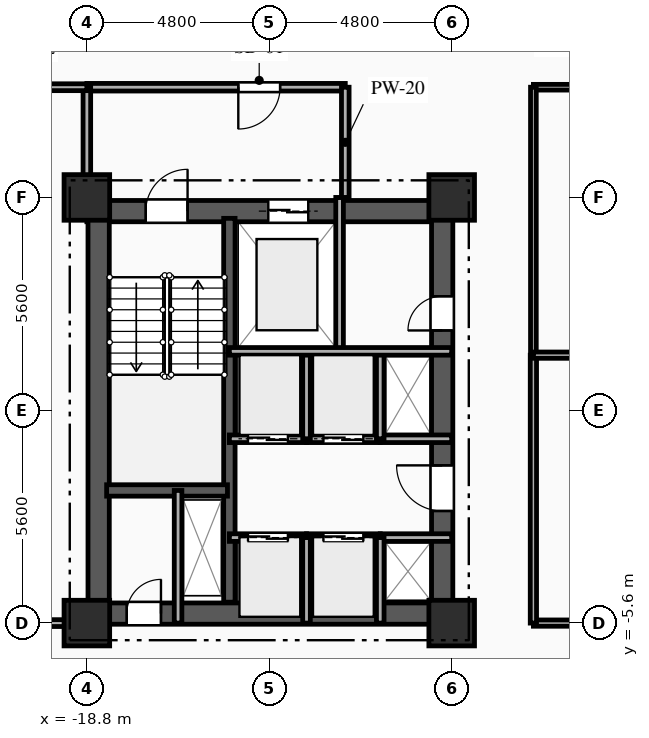
"""IFC4 building model, lengths in metres.
Left out: names, types, materials, properties, quantities, classifications, styles, units other than length and angle.
Written with IfcOpenShell. Run it as: python <this file> out.ifc"""

import sys

from ifc_helpers import new_model, si_unit, direction, frame, frame_2d, origin, origin_2d, place, context, subcontext, project, spatial, rectangle, extrude, element, fill, save


model = new_model("IFC4")
c1 = context("Model", 3, precision=1e-05, world=origin(), true_north=direction((0.0, 1.0)))
c2 = subcontext(c1, "Body", "Model", "MODEL_VIEW")
j1 = project(units=[si_unit("LENGTHUNIT", "METRE"), si_unit("PLANEANGLEUNIT", "RADIAN")], contexts=[c1])
p1 = place(None, origin())
s1 = spatial("IfcSite", under=j1, at=p1, CompositionType="ELEMENT")
p2 = place(p1, origin())
s2 = spatial("IfcBuilding", under=s1, at=p2, CompositionType="ELEMENT")
p3 = place(p2, frame((0.0, 0.0, 57.15)))
s3 = spatial("IfcBuildingStorey", under=s2, at=p3, CompositionType="ELEMENT", Elevation=57.15)
for number, where, z_axis, x_axis in (
    (1, (-18.8, -5.6, 0.0), (0.0, 0.0, 1.0), (1.0, 0.0, 0.0)),
    (2, (-18.8, 5.6, 0.0), (0.0, 0.0, 1.0), (1.0, 0.0, 0.0)),
    (3, (-9.2, -5.6, 0.0), (0.0, 0.0, 1.0), (1.0, 0.0, 0.0)),
    (4, (-9.2, 5.6, 0.0), (0.0, 0.0, 1.0), (1.0, 0.0, 0.0)),
):
    element("IfcColumn", number, at=place(p3, frame(where, z_axis=z_axis, x_axis=x_axis)), inside=s3, PredefinedType="COLUMN", context=c2, shape_type="SweptSolid", body=[
        extrude(rectangle(XDim=1.2, YDim=1.2, at=origin_2d()), origin(), (0.0, 0.0, 1.0), 3.35),
    ])
p4 = place(p3, frame((-18.8, 5.24, 0.0), z_axis=(0.0, 0.0, 1.0), x_axis=(1.0, 0.0, 0.0)))
e5 = element("IfcWall", 5, at=p4, inside=s3, PredefinedType="SHEAR", context=c2, shape_type="SweptSolid", body=[
    extrude(rectangle(XDim=9.6, YDim=0.56, at=frame_2d((4.8, 0.0))), origin(), (0.0, 0.0, 1.0), 3.035),
])
p5 = place(p4, frame((1.55, 0.0, 0.0)))
e6 = element("IfcOpeningElement", 6, at=p5, cuts=e5, PredefinedType="OPENING", context=c2, shape_type="SweptSolid", body=[
    extrude(rectangle(XDim=1.1, YDim=2.15, at=frame_2d((0.55, 1.075))), frame((0.0, 0.29, 0.0), z_axis=(0.0, -1.0, 0.0), x_axis=(1.0, 0.0, 0.0)), (0.0, 0.0, 1.0), 0.58),
])
p6 = place(p4, frame((4.775, 0.0, 0.0)))
e7 = element("IfcOpeningElement", 7, at=p6, cuts=e5, PredefinedType="OPENING", context=c2, shape_type="SweptSolid", body=[
    extrude(rectangle(XDim=1.05, YDim=2.1, at=frame_2d((0.525, 1.05))), frame((0.0, 0.29, 0.0), z_axis=(0.0, -1.0, 0.0), x_axis=(1.0, 0.0, 0.0)), (0.0, 0.0, 1.0), 0.58),
])
p7 = place(p3, frame((-18.8, -5.35, 0.0), z_axis=(0.0, 0.0, 1.0), x_axis=(1.0, 0.0, 0.0)))
e8 = element("IfcWall", 8, at=p7, inside=s3, PredefinedType="SHEAR", context=c2, shape_type="SweptSolid", body=[
    extrude(rectangle(XDim=9.6, YDim=0.56, at=frame_2d((4.8, 0.0))), origin(), (0.0, 0.0, 1.0), 3.035),
])
p8 = place(p7, frame((1.05, 0.0, 0.0)))
e9 = element("IfcOpeningElement", 9, at=p8, cuts=e8, PredefinedType="OPENING", context=c2, shape_type="SweptSolid", body=[
    extrude(rectangle(XDim=0.9, YDim=2.1, at=frame_2d((0.45, 1.05))), frame((0.0, 0.29, 0.0), z_axis=(0.0, -1.0, 0.0), x_axis=(1.0, 0.0, 0.0)), (0.0, 0.0, 1.0), 0.58),
])
p9 = place(p3, frame((-18.49, -5.05, 0.0), z_axis=(0.0, 0.0, 1.0), x_axis=(0.0, 1.0, 0.0)))
e10 = element("IfcWall", 10, at=p9, inside=s3, PredefinedType="SHEAR", context=c2, shape_type="SweptSolid", body=[
    extrude(rectangle(XDim=10.1, YDim=0.56, at=frame_2d((5.05, 0.0))), origin(), (0.0, 0.0, 1.0), 3.035),
])
p10 = place(p3, frame((-9.45, -5.05, 0.0), z_axis=(0.0, 0.0, 1.0), x_axis=(0.0, 1.0, 0.0)))
e11 = element("IfcWall", 11, at=p10, inside=s3, PredefinedType="SHEAR", context=c2, shape_type="SweptSolid", body=[
    extrude(rectangle(XDim=10.1, YDim=0.56, at=frame_2d((5.05, 0.0))), origin(), (0.0, 0.0, 1.0), 3.035),
])
p11 = place(p10, frame((7.15, 0.0, 0.0)))
e12 = element("IfcOpeningElement", 12, at=p11, cuts=e11, PredefinedType="OPENING", context=c2, shape_type="SweptSolid", body=[
    extrude(rectangle(XDim=0.9, YDim=2.1, at=frame_2d((0.45, 1.05))), frame((0.0, 0.29, 0.0), z_axis=(0.0, -1.0, 0.0), x_axis=(1.0, 0.0, 0.0)), (0.0, 0.0, 1.0), 0.58),
])
p12 = place(p10, frame((2.4, 0.0, 0.0)))
e13 = element("IfcOpeningElement", 13, at=p12, cuts=e11, PredefinedType="OPENING", context=c2, shape_type="SweptSolid", body=[
    extrude(rectangle(XDim=1.2, YDim=2.15, at=frame_2d((0.6, 1.075))), frame((0.0, 0.29, 0.0), z_axis=(0.0, -1.0, 0.0), x_axis=(1.0, 0.0, 0.0)), (0.0, 0.0, 1.0), 0.58),
])
p13 = place(p3, frame((-15.05, -5.05, 0.0), z_axis=(0.0, 0.0, 1.0), x_axis=(0.0, 1.0, 0.0)))
e14 = element("IfcWall", 14, at=p13, inside=s3, PredefinedType="SHEAR", context=c2, shape_type="SweptSolid", body=[
    extrude(rectangle(XDim=10.1, YDim=0.3, at=frame_2d((5.05, 0.0))), origin(), (0.0, 0.0, 1.0), 3.035),
])
p14 = place(p3, frame((-18.28, -2.11, 0.0), z_axis=(0.0, 0.0, 1.0), x_axis=(1.0, 0.0, 0.0)))
e15 = element("IfcWall", 15, at=p14, inside=s3, PredefinedType="SHEAR", context=c2, shape_type="SweptSolid", body=[
    extrude(rectangle(XDim=3.18, YDim=0.3, at=frame_2d((1.59, 0.0))), origin(), (0.0, 0.0, 1.0), 3.035),
])
p15 = place(p3, frame((-16.4, -5.6, 0.0), z_axis=(0.0, 0.0, 1.0), x_axis=(0.0, 1.0, 0.0)))
e16 = element("IfcWall", 16, at=p15, inside=s3, PredefinedType="PARTITIONING", context=c2, shape_type="SweptSolid", body=[
    extrude(rectangle(XDim=3.49, YDim=0.2, at=frame_2d((1.745, 0.0))), origin(), (0.0, 0.0, 1.0), 3.035),
])
p16 = place(p3, frame((-12.15, 1.55, 0.0), z_axis=(0.0, 0.0, 1.0), x_axis=(0.0, 1.0, 0.0)))
e17 = element("IfcWall", 17, at=p16, inside=s3, PredefinedType="PARTITIONING", context=c2, shape_type="SweptSolid", body=[
    extrude(rectangle(XDim=4.05, YDim=0.2, at=frame_2d((2.025, 0.0))), origin(), (0.0, 0.0, 1.0), 3.035),
])
p17 = place(p3, frame((-12.0, 8.5, 0.0), z_axis=(0.0, 0.0, 1.0), x_axis=(-1.0, 0.0, 0.0)))
e18 = element("IfcWall", 18, at=p17, inside=s3, PredefinedType="PARTITIONING", context=c2, shape_type="SweptSolid", body=[
    extrude(rectangle(XDim=6.8, YDim=0.2, at=frame_2d((3.4, 0.0))), origin(), (0.0, 0.0, 1.0), 3.035),
])
p18 = place(p17, frame((1.715, 0.0, 0.0)))
e19 = element("IfcOpeningElement", 19, at=p18, cuts=e18, PredefinedType="OPENING", context=c2, shape_type="SweptSolid", body=[
    extrude(rectangle(XDim=1.1, YDim=2.15, at=frame_2d((0.55, 1.075))), frame((0.0, 0.11, 0.0), z_axis=(0.0, -1.0, 0.0), x_axis=(1.0, 0.0, 0.0)), (0.0, 0.0, 1.0), 0.22),
])
p19 = place(p3, frame((-12.0, 5.6, 0.0), z_axis=(0.0, 0.0, 1.0), x_axis=(0.0, 1.0, 0.0)))
e20 = element("IfcWall", 20, at=p19, inside=s3, PredefinedType="PARTITIONING", context=c2, shape_type="SweptSolid", body=[
    extrude(rectangle(XDim=2.9, YDim=0.2, at=frame_2d((1.45, 0.0))), origin(), (0.0, 0.0, 1.0), 3.035),
])
p20 = place(p3, frame((-18.8, 8.5, 0.0), z_axis=(0.0, 0.0, 1.0), x_axis=(0.0, -1.0, 0.0)))
e21 = element("IfcWall", 21, at=p20, inside=s3, PredefinedType="PARTITIONING", context=c2, shape_type="SweptSolid", body=[
    extrude(rectangle(XDim=2.9, YDim=0.2, at=frame_2d((1.45, 0.0))), origin(), (0.0, 0.0, 1.0), 2.52),
])
p21 = place(p3, frame((-15.05, -3.35, 0.0), z_axis=(0.0, 0.0, 1.0), x_axis=(1.0, 0.0, 0.0)))
e22 = element("IfcWall", 22, at=p21, inside=s3, PredefinedType="PARTITIONING", context=c2, shape_type="SweptSolid", body=[
    extrude(rectangle(XDim=2.03, YDim=0.2, at=frame_2d((1.015, 0.0))), origin(), (0.0, 0.0, 1.0), 3.035),
])
p22 = place(p21, frame((0.49, 0.0, 0.0)))
e23 = element("IfcOpeningElement", 23, at=p22, cuts=e22, PredefinedType="OPENING", context=c2, shape_type="SweptSolid", body=[
    extrude(rectangle(XDim=1.05, YDim=2.1, at=frame_2d((0.525, 1.05))), frame((0.0, 0.11, 0.0), z_axis=(0.0, -1.0, 0.0), x_axis=(1.0, 0.0, 0.0)), (0.0, 0.0, 1.0), 0.22),
])
p23 = place(p3, frame((-13.02, -3.35, 0.0), z_axis=(0.0, 0.0, 1.0), x_axis=(1.0, 0.0, 0.0)))
e24 = element("IfcWall", 24, at=p23, inside=s3, PredefinedType="PARTITIONING", context=c2, shape_type="SweptSolid", body=[
    extrude(rectangle(XDim=1.94, YDim=0.2, at=frame_2d((0.97, 0.0))), origin(), (0.0, 0.0, 1.0), 3.035),
])
p24 = place(p23, frame((0.445, 0.0, 0.0)))
e25 = element("IfcOpeningElement", 25, at=p24, cuts=e24, PredefinedType="OPENING", context=c2, shape_type="SweptSolid", body=[
    extrude(rectangle(XDim=1.05, YDim=2.1, at=frame_2d((0.525, 1.05))), frame((0.0, 0.11, 0.0), z_axis=(0.0, -1.0, 0.0), x_axis=(1.0, 0.0, 0.0)), (0.0, 0.0, 1.0), 0.22),
])
p25 = place(p3, frame((-11.08, -3.35, 0.0), z_axis=(0.0, 0.0, 1.0), x_axis=(1.0, 0.0, 0.0)))
e26 = element("IfcWall", 26, at=p25, inside=s3, PredefinedType="PARTITIONING", context=c2, shape_type="SweptSolid", body=[
    extrude(rectangle(XDim=1.88, YDim=0.2, at=frame_2d((0.94, 0.0))), origin(), (0.0, 0.0, 1.0), 2.75),
])
p26 = place(p3, frame((-13.02, -0.75, 0.0), z_axis=(0.0, 0.0, 1.0), x_axis=(-1.0, 0.0, 0.0)))
e27 = element("IfcWall", 27, at=p26, inside=s3, PredefinedType="PARTITIONING", context=c2, shape_type="SweptSolid", body=[
    extrude(rectangle(XDim=2.03, YDim=0.2, at=frame_2d((1.015, 0.0))), origin(), (0.0, 0.0, 1.0), 3.035),
])
p27 = place(p26, frame((0.49, 0.0, 0.0)))
e28 = element("IfcOpeningElement", 28, at=p27, cuts=e27, PredefinedType="OPENING", context=c2, shape_type="SweptSolid", body=[
    extrude(rectangle(XDim=1.05, YDim=2.1, at=frame_2d((0.525, 1.05))), frame((0.0, 0.11, 0.0), z_axis=(0.0, -1.0, 0.0), x_axis=(1.0, 0.0, 0.0)), (0.0, 0.0, 1.0), 0.22),
])
p28 = place(p3, frame((-11.08, -0.75, 0.0), z_axis=(0.0, 0.0, 1.0), x_axis=(-1.0, 0.0, 0.0)))
e29 = element("IfcWall", 29, at=p28, inside=s3, PredefinedType="PARTITIONING", context=c2, shape_type="SweptSolid", body=[
    extrude(rectangle(XDim=1.94, YDim=0.2, at=frame_2d((0.97, 0.0))), origin(), (0.0, 0.0, 1.0), 3.035),
])
p29 = place(p28, frame((0.445, 0.0, 0.0)))
e30 = element("IfcOpeningElement", 30, at=p29, cuts=e29, PredefinedType="OPENING", context=c2, shape_type="SweptSolid", body=[
    extrude(rectangle(XDim=1.05, YDim=2.1, at=frame_2d((0.525, 1.05))), frame((0.0, 0.11, 0.0), z_axis=(0.0, -1.0, 0.0), x_axis=(1.0, 0.0, 0.0)), (0.0, 0.0, 1.0), 0.22),
])
p30 = place(p3, frame((-9.2, -0.75, 0.0), z_axis=(0.0, 0.0, 1.0), x_axis=(-1.0, 0.0, 0.0)))
e31 = element("IfcWall", 31, at=p30, inside=s3, PredefinedType="PARTITIONING", context=c2, shape_type="SweptSolid", body=[
    extrude(rectangle(XDim=1.88, YDim=0.2, at=frame_2d((0.94, 0.0))), origin(), (0.0, 0.0, 1.0), 3.035),
])
for number, where, z_axis, x_axis in (
    (32, (-13.02, -5.6, 0.0), (0.0, 0.0, 1.0), (0.0, 1.0, 0.0)),
    (33, (-11.08, -5.6, 0.0), (0.0, 0.0, 1.0), (0.0, 1.0, 0.0)),
):
    element("IfcWall", number, at=place(p3, frame(where, z_axis=z_axis, x_axis=x_axis)), inside=s3, PredefinedType="PARTITIONING", context=c2, shape_type="SweptSolid", body=[
        extrude(rectangle(XDim=2.25, YDim=0.2, at=frame_2d((1.125, 0.0))), origin(), (0.0, 0.0, 1.0), 3.035),
    ])
for number, where, z_axis, x_axis in (
    (34, (-13.02, -0.75, 0.0), (0.0, 0.0, 1.0), (0.0, 1.0, 0.0)),
    (35, (-11.08, -0.75, 0.0), (0.0, 0.0, 1.0), (0.0, 1.0, 0.0)),
):
    element("IfcWall", number, at=place(p3, frame(where, z_axis=z_axis, x_axis=x_axis)), inside=s3, PredefinedType="PARTITIONING", context=c2, shape_type="SweptSolid", body=[
        extrude(rectangle(XDim=2.3, YDim=0.2, at=frame_2d((1.15, 0.0))), origin(), (0.0, 0.0, 1.0), 3.035),
    ])
p31 = place(p3, frame((-18.8, 8.5, 0.0), z_axis=(0.0, 0.0, 1.0), x_axis=(-1.0, 0.0, 0.0)))
e36 = element("IfcWall", 36, at=p31, inside=s3, PredefinedType="PARTITIONING", context=c2, shape_type="SweptSolid", body=[
    extrude(rectangle(XDim=2.65, YDim=0.18, at=frame_2d((1.325, 0.0))), origin(), (0.0, 0.0, 1.0), 3.035),
])
p32 = place(p31, frame((1.009, 0.0, 0.0)))
e37 = element("IfcOpeningElement", 37, at=p32, cuts=e36, PredefinedType="OPENING", context=c2, shape_type="SweptSolid", body=[
    extrude(rectangle(XDim=1.0, YDim=2.15, at=frame_2d((0.5, 1.075))), frame((0.0, 0.1, 0.0), z_axis=(0.0, -1.0, 0.0), x_axis=(1.0, 0.0, 0.0)), (0.0, 0.0, 1.0), 0.2),
])
p33 = place(p3, frame((0.0, 8.5, 0.0), z_axis=(0.0, 0.0, 1.0), x_axis=(-1.0, 0.0, 0.0)))
e38 = element("IfcWall", 38, at=p33, inside=s3, PredefinedType="PARTITIONING", context=c2, shape_type="SweptSolid", body=[
    extrude(rectangle(XDim=7.05, YDim=0.15, at=frame_2d((3.525, 0.0))), origin(), (0.0, 0.0, 1.0), 3.035),
])
p34 = place(p33, frame((1.185, 0.0, 0.0)))
e39 = element("IfcOpeningElement", 39, at=p34, cuts=e38, PredefinedType="OPENING", context=c2, shape_type="SweptSolid", body=[
    extrude(rectangle(XDim=1.05, YDim=2.15, at=frame_2d((0.525, 1.075))), frame((0.0, 0.085, 0.0), z_axis=(0.0, -1.0, 0.0), x_axis=(1.0, 0.0, 0.0)), (0.0, 0.0, 1.0), 0.17),
])
p35 = place(p3, frame((-21.45, -5.6, 0.0), z_axis=(0.0, 0.0, 1.0), x_axis=(1.0, 0.0, 0.0)))
e40 = element("IfcWall", 40, at=p35, inside=s3, PredefinedType="PARTITIONING", context=c2, shape_type="SweptSolid", body=[
    extrude(rectangle(XDim=2.65, YDim=0.18, at=frame_2d((1.325, 0.0))), origin(), (0.0, 0.0, 1.0), 3.035),
])
p36 = place(p3, frame((-7.05, -5.6, 0.0), z_axis=(0.0, 0.0, 1.0), x_axis=(1.0, 0.0, 0.0)))
e41 = element("IfcWall", 41, at=p36, inside=s3, PredefinedType="PARTITIONING", context=c2, shape_type="SweptSolid", body=[
    extrude(rectangle(XDim=7.05, YDim=0.165, at=frame_2d((3.525, 0.0))), origin(), (0.0, 0.0, 1.0), 2.52),
])
p37 = place(p36, frame((4.728, 0.0, 0.0)))
e42 = element("IfcOpeningElement", 42, at=p37, cuts=e41, PredefinedType="OPENING", context=c2, shape_type="SweptSolid", body=[
    extrude(rectangle(XDim=1.15, YDim=2.15, at=frame_2d((0.575, 1.075))), frame((0.0, 0.093, 0.0), z_axis=(0.0, -1.0, 0.0), x_axis=(1.0, 0.0, 0.0)), (0.0, 0.0, 1.0), 0.185),
])
p38 = place(p3, frame((-7.05, 1.45, 0.0), z_axis=(0.0, 0.0, 1.0), x_axis=(0.0, -1.0, 0.0)))
e43 = element("IfcWall", 43, at=p38, inside=s3, PredefinedType="PARTITIONING", context=c2, shape_type="SweptSolid", body=[
    extrude(rectangle(XDim=7.05, YDim=0.165, at=frame_2d((3.525, 0.0))), origin(), (0.0, 0.0, 1.0), 3.035),
])
p39 = place(p3, frame((-7.05, 8.5, 0.0), z_axis=(0.0, 0.0, 1.0), x_axis=(0.0, -1.0, 0.0)))
e44 = element("IfcWall", 44, at=p39, inside=s3, PredefinedType="PARTITIONING", context=c2, shape_type="SweptSolid", body=[
    extrude(rectangle(XDim=7.05, YDim=0.15, at=frame_2d((3.525, 0.0))), origin(), (0.0, 0.0, 1.0), 3.035),
])
p40 = place(p3, frame((-7.05, 1.45, 0.0), z_axis=(0.0, 0.0, 1.0), x_axis=(1.0, 0.0, 0.0)))
e45 = element("IfcWall", 45, at=p40, inside=s3, PredefinedType="PARTITIONING", context=c2, shape_type="SweptSolid", body=[
    extrude(rectangle(XDim=14.1, YDim=0.165, at=frame_2d((7.05, 0.0))), origin(), (0.0, 0.0, 1.0), 3.035),
])
p41 = place(p3, frame((-15.05, 1.55, 0.0), z_axis=(0.0, 0.0, 1.0), x_axis=(1.0, 0.0, 0.0)))
e46 = element("IfcWall", 46, at=p41, inside=s3, PredefinedType="PARTITIONING", context=c2, shape_type="SweptSolid", body=[
    extrude(rectangle(XDim=5.85, YDim=0.2, at=frame_2d((2.925, 0.0))), origin(), (0.0, 0.0, 1.0), 3.035),
])
p42 = place(p5, origin())
e47 = element("IfcDoor", 47, at=p42, inside=s3, OperationType="SINGLE_SWING_RIGHT", PredefinedType="DOOR", context=c2, shape_type="SweptSolid", body=[
    extrude(rectangle(XDim=1.1, YDim=2.15, at=frame_2d((0.55, 1.075))), frame((0.0, 0.025, 0.0), z_axis=(0.0, -1.0, 0.0), x_axis=(1.0, 0.0, 0.0)), (0.0, 0.0, 1.0), 0.05),
])
fill(e6, e47)
p43 = place(p6, origin())
e48 = element("IfcDoor", 48, at=p43, inside=s3, OperationType="DOUBLE_DOOR_SLIDING", PredefinedType="DOOR", context=c2, shape_type="SweptSolid", body=[
    extrude(rectangle(XDim=1.05, YDim=2.1, at=frame_2d((0.525, 1.05))), frame((0.0, 0.025, 0.0), z_axis=(0.0, -1.0, 0.0), x_axis=(1.0, 0.0, 0.0)), (0.0, 0.0, 1.0), 0.05),
])
fill(e7, e48)
p44 = place(p8, origin())
e49 = element("IfcDoor", 49, at=p44, inside=s3, OperationType="SINGLE_SWING_RIGHT", PredefinedType="DOOR", context=c2, shape_type="SweptSolid", body=[
    extrude(rectangle(XDim=0.9, YDim=2.1, at=frame_2d((0.45, 1.05))), frame((0.0, 0.025, 0.0), z_axis=(0.0, -1.0, 0.0), x_axis=(1.0, 0.0, 0.0)), (0.0, 0.0, 1.0), 0.05),
])
fill(e9, e49)
p45 = place(p18, origin())
e50 = element("IfcDoor", 50, at=p45, inside=s3, OperationType="SINGLE_SWING_RIGHT", PredefinedType="DOOR", context=c2, shape_type="SweptSolid", body=[
    extrude(rectangle(XDim=1.1, YDim=2.15, at=frame_2d((0.55, 1.075))), frame((0.0, 0.025, 0.0), z_axis=(0.0, -1.0, 0.0), x_axis=(1.0, 0.0, 0.0)), (0.0, 0.0, 1.0), 0.05),
])
fill(e19, e50)
p46 = place(p11, origin())
e51 = element("IfcDoor", 51, at=p46, inside=s3, OperationType="SINGLE_SWING_LEFT", PredefinedType="DOOR", context=c2, shape_type="SweptSolid", body=[
    extrude(rectangle(XDim=0.9, YDim=2.1, at=frame_2d((0.45, 1.05))), frame((0.0, 0.025, 0.0), z_axis=(0.0, -1.0, 0.0), x_axis=(1.0, 0.0, 0.0)), (0.0, 0.0, 1.0), 0.05),
])
fill(e12, e51)
p47 = place(p22, origin())
e52 = element("IfcDoor", 52, at=p47, inside=s3, OperationType="DOUBLE_DOOR_SLIDING", PredefinedType="DOOR", context=c2, shape_type="SweptSolid", body=[
    extrude(rectangle(XDim=1.05, YDim=2.1, at=frame_2d((0.525, 1.05))), frame((0.0, 0.025, 0.0), z_axis=(0.0, -1.0, 0.0), x_axis=(1.0, 0.0, 0.0)), (0.0, 0.0, 1.0), 0.05),
])
fill(e23, e52)
p48 = place(p24, origin())
e53 = element("IfcDoor", 53, at=p48, inside=s3, OperationType="DOUBLE_DOOR_SLIDING", PredefinedType="DOOR", context=c2, shape_type="SweptSolid", body=[
    extrude(rectangle(XDim=1.05, YDim=2.1, at=frame_2d((0.525, 1.05))), frame((0.0, 0.025, 0.0), z_axis=(0.0, -1.0, 0.0), x_axis=(1.0, 0.0, 0.0)), (0.0, 0.0, 1.0), 0.05),
])
fill(e25, e53)
p49 = place(p27, origin())
e54 = element("IfcDoor", 54, at=p49, inside=s3, OperationType="DOUBLE_DOOR_SLIDING", PredefinedType="DOOR", context=c2, shape_type="SweptSolid", body=[
    extrude(rectangle(XDim=1.05, YDim=2.1, at=frame_2d((0.525, 1.05))), frame((0.0, 0.025, 0.0), z_axis=(0.0, -1.0, 0.0), x_axis=(1.0, 0.0, 0.0)), (0.0, 0.0, 1.0), 0.05),
])
fill(e28, e54)
p50 = place(p29, origin())
e55 = element("IfcDoor", 55, at=p50, inside=s3, OperationType="DOUBLE_DOOR_SLIDING", PredefinedType="DOOR", context=c2, shape_type="SweptSolid", body=[
    extrude(rectangle(XDim=1.05, YDim=2.1, at=frame_2d((0.525, 1.05))), frame((0.0, 0.025, 0.0), z_axis=(0.0, -1.0, 0.0), x_axis=(1.0, 0.0, 0.0)), (0.0, 0.0, 1.0), 0.05),
])
fill(e30, e55)
p51 = place(p12, origin())
e56 = element("IfcDoor", 56, at=p51, inside=s3, OperationType="SINGLE_SWING_RIGHT", PredefinedType="DOOR", context=c2, shape_type="SweptSolid", body=[
    extrude(rectangle(XDim=1.2, YDim=2.15, at=frame_2d((0.6, 1.075))), frame((0.0, 0.025, 0.0), z_axis=(0.0, -1.0, 0.0), x_axis=(1.0, 0.0, 0.0)), (0.0, 0.0, 1.0), 0.05),
])
fill(e13, e56)
save(model, sys.argv[1])
